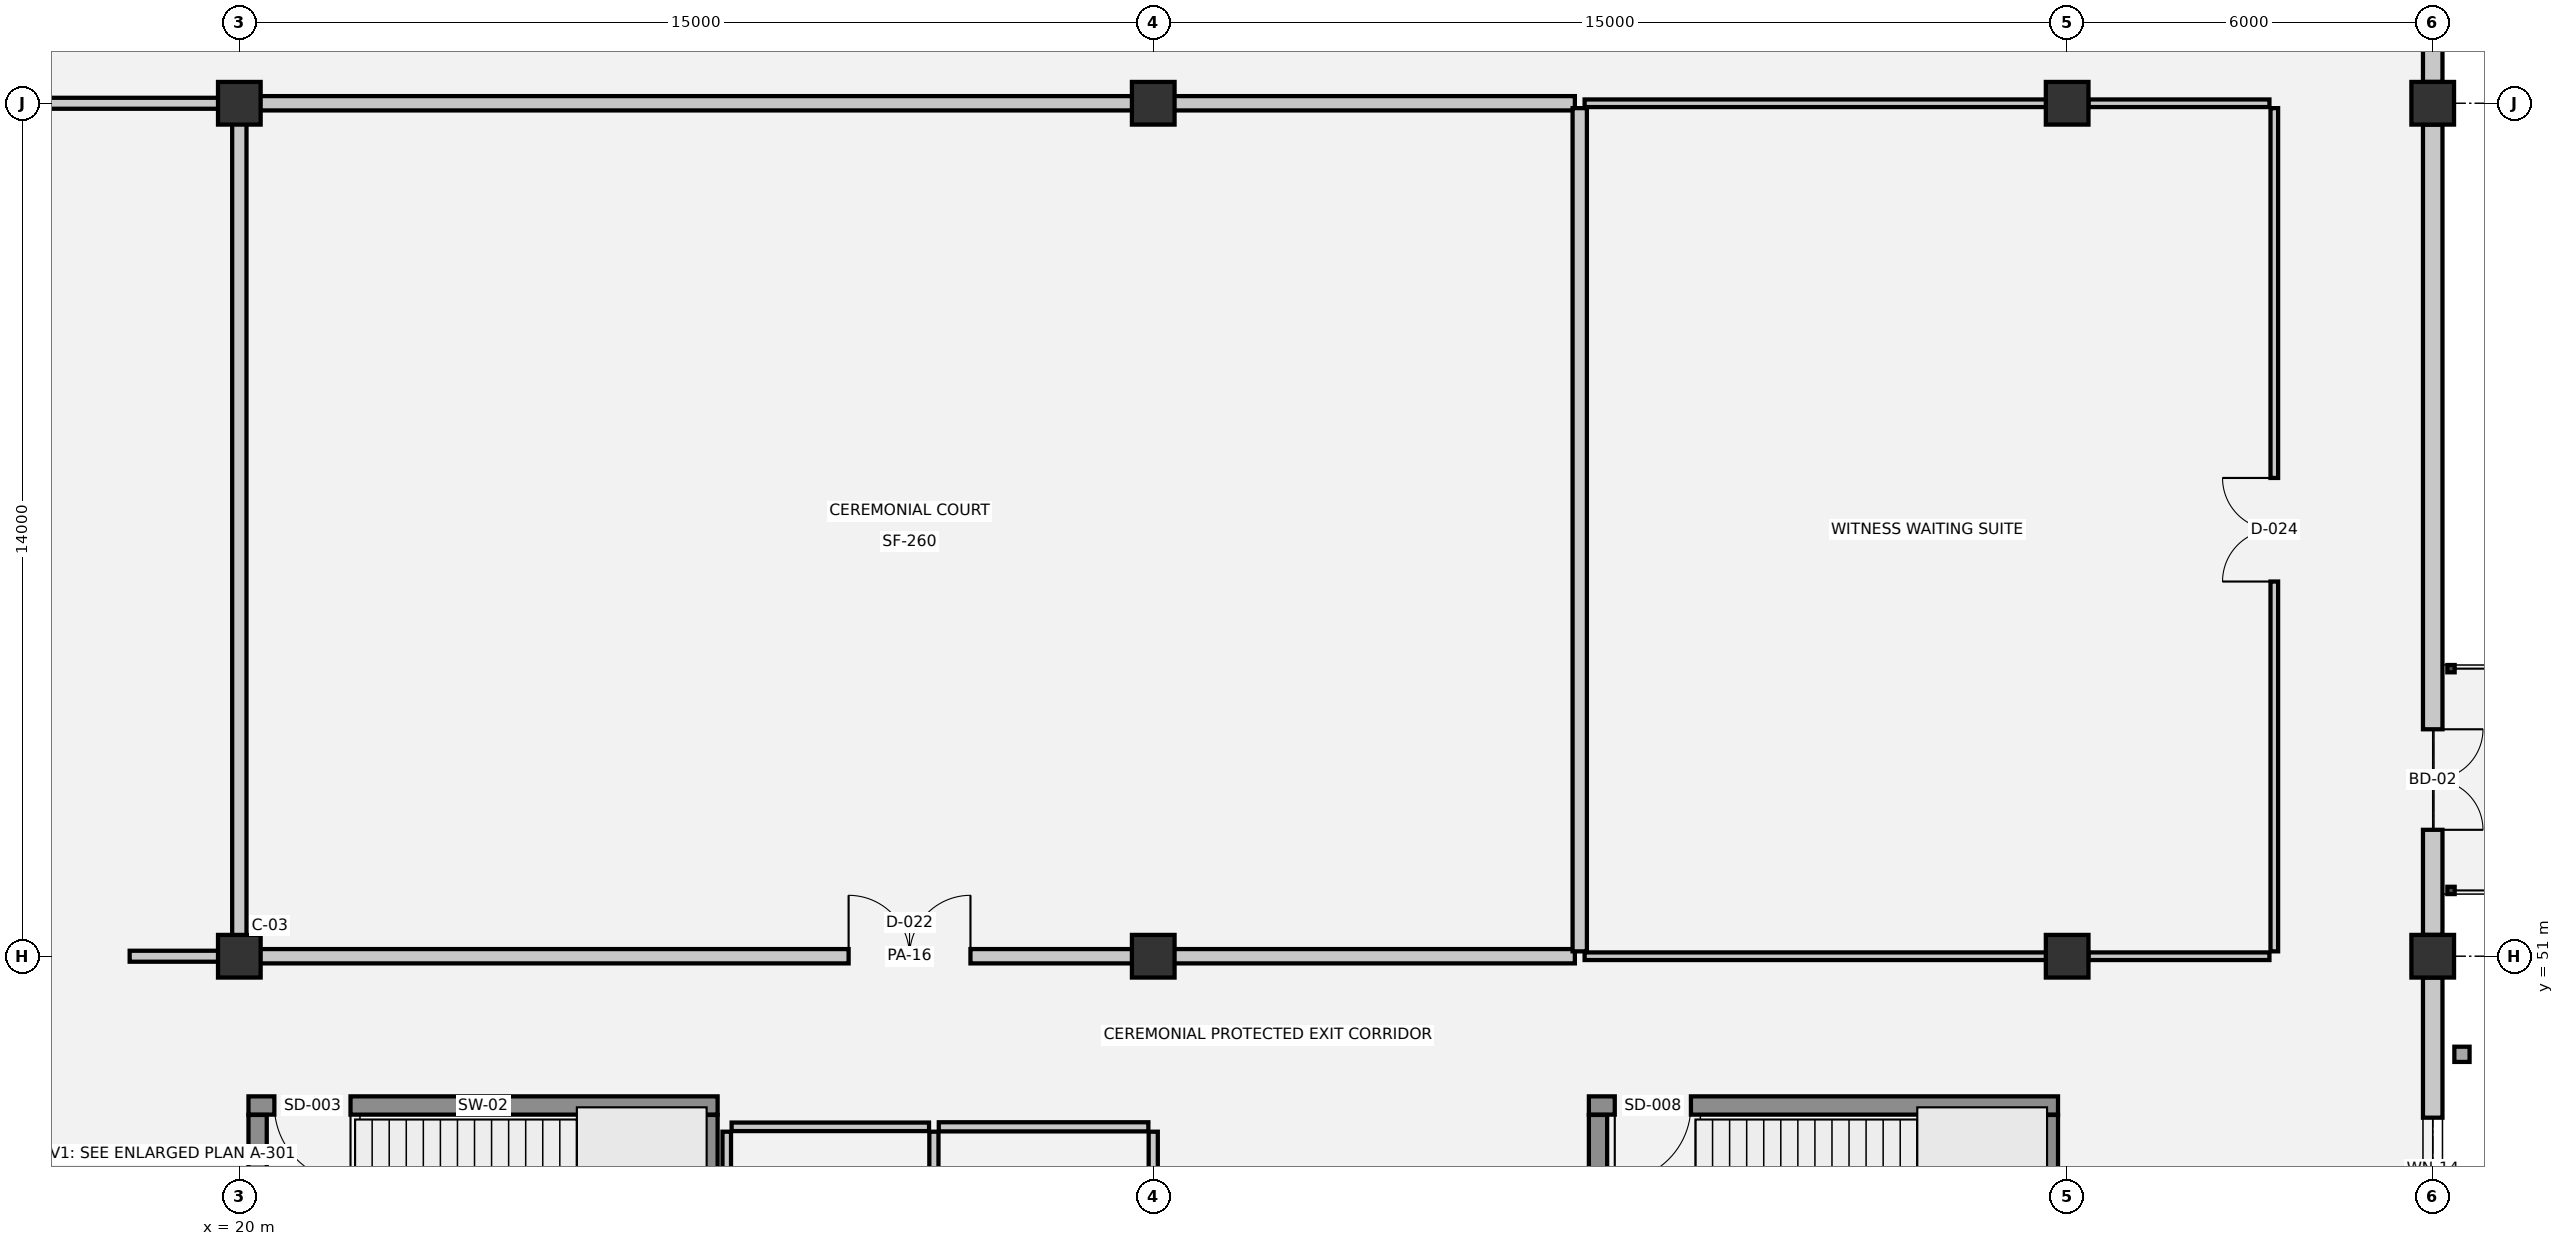
"""IFC4 building model, lengths in metres.
Left out: names, types, materials, properties, quantities, classifications, styles, units other than length and angle.
Written with IfcOpenShell. Run it as: python <this file> out.ifc"""

import sys

from ifc_helpers import new_model, si_unit, direction, frame, frame_2d, origin, origin_2d, place, context, subcontext, project, spatial, rectangle, extrude, element, fill, save


model = new_model("IFC4")
c1 = context("Model", 3, precision=1e-05, world=origin(), true_north=direction((0.0, 1.0)))
c2 = subcontext(c1, "Body", "Model", "MODEL_VIEW")
j1 = project(units=[si_unit("LENGTHUNIT", "METRE"), si_unit("PLANEANGLEUNIT", "RADIAN")], contexts=[c1])
p1 = place(None, origin())
s1 = spatial("IfcSite", under=j1, at=p1, CompositionType="ELEMENT")
p2 = place(p1, origin())
s2 = spatial("IfcBuilding", under=s1, at=p2, CompositionType="ELEMENT")
p3 = place(p2, frame((0.0, 0.0, 5.4)))
s3 = spatial("IfcBuildingStorey", under=s2, at=p3, CompositionType="ELEMENT", Elevation=5.4)
for number, where, z_axis, x_axis in (
    (1, (20.0, 51.0, 0.0), (0.0, 0.0, 1.0), (1.0, 0.0, 0.0)),
    (2, (20.0, 65.0, 0.0), (0.0, 0.0, 1.0), (1.0, 0.0, 0.0)),
    (3, (35.0, 51.0, 0.0), (0.0, 0.0, 1.0), (1.0, 0.0, 0.0)),
    (4, (35.0, 65.0, 0.0), (0.0, 0.0, 1.0), (1.0, 0.0, 0.0)),
    (5, (50.0, 51.0, 0.0), (0.0, 0.0, 1.0), (1.0, 0.0, 0.0)),
    (6, (50.0, 65.0, 0.0), (0.0, 0.0, 1.0), (1.0, 0.0, 0.0)),
    (7, (56.0, 51.0, 0.0), (0.0, 0.0, 1.0), (1.0, 0.0, 0.0)),
    (8, (56.0, 65.0, 0.0), (0.0, 0.0, 1.0), (1.0, 0.0, 0.0)),
):
    element("IfcColumn", number, at=place(p3, frame(where, z_axis=z_axis, x_axis=x_axis)), inside=s3, PredefinedType="COLUMN", context=c2, shape_type="SweptSolid", body=[
        extrude(rectangle(XDim=0.7, YDim=0.7, at=origin_2d()), origin(), (0.0, 0.0, 1.0), 4.5),
    ])
p4 = place(p3, frame((56.0, 71.65, 0.0), z_axis=(0.0, 0.0, 1.0), x_axis=(0.0, -1.0, 0.0)))
e9 = element("IfcWall", 9, at=p4, inside=s3, PredefinedType="SOLIDWALL", context=c2, shape_type="SweptSolid", body=[
    extrude(rectangle(XDim=6.3, YDim=0.32, at=frame_2d((3.15, 0.0))), origin(), (0.0, 0.0, 1.0), 3.11),
])
p5 = place(p4, frame((2.3, 0.0, 0.9)))
e10 = element("IfcOpeningElement", 10, at=p5, cuts=e9, PredefinedType="OPENING", context=c2, shape_type="SweptSolid", body=[
    extrude(rectangle(XDim=1.7, YDim=1.9, at=frame_2d((0.85, 0.95))), frame((0.0, 0.17, 0.0), z_axis=(0.0, -1.0, 0.0), x_axis=(1.0, 0.0, 0.0)), (0.0, 0.0, 1.0), 0.34),
])
p6 = place(p3, frame((56.0, 64.65, 0.0), z_axis=(0.0, 0.0, 1.0), x_axis=(0.0, -1.0, 0.0)))
e11 = element("IfcWall", 11, at=p6, inside=s3, PredefinedType="SOLIDWALL", context=c2, shape_type="SweptSolid", body=[
    extrude(rectangle(XDim=13.3, YDim=0.32, at=frame_2d((6.65, 0.0))), origin(), (0.0, 0.0, 1.0), 3.11),
])
p7 = place(p6, frame((9.925, 0.0, 0.0)))
e12 = element("IfcOpeningElement", 12, at=p7, cuts=e11, PredefinedType="OPENING", context=c2, shape_type="SweptSolid", body=[
    extrude(rectangle(XDim=1.65, YDim=2.2, at=frame_2d((0.825, 1.1))), frame((0.0, 0.17, 0.0), z_axis=(0.0, -1.0, 0.0), x_axis=(1.0, 0.0, 0.0)), (0.0, 0.0, 1.0), 0.34),
])
p8 = place(p3, frame((56.0, 50.65, 0.0), z_axis=(0.0, 0.0, 1.0), x_axis=(0.0, -1.0, 0.0)))
e13 = element("IfcWall", 13, at=p8, inside=s3, PredefinedType="SOLIDWALL", context=c2, shape_type="SweptSolid", body=[
    extrude(rectangle(XDim=6.3, YDim=0.32, at=frame_2d((3.15, 0.0))), origin(), (0.0, 0.0, 1.0), 3.11),
])
p9 = place(p8, frame((2.3, 0.0, 0.9)))
e14 = element("IfcOpeningElement", 14, at=p9, cuts=e13, PredefinedType="OPENING", context=c2, shape_type="SweptSolid", body=[
    extrude(rectangle(XDim=1.7, YDim=1.9, at=frame_2d((0.85, 0.95))), frame((0.0, 0.17, 0.0), z_axis=(0.0, -1.0, 0.0), x_axis=(1.0, 0.0, 0.0)), (0.0, 0.0, 1.0), 0.34),
])
p10 = place(p3, frame((27.85, 48.55, 0.0), z_axis=(0.0, 0.0, 1.0), x_axis=(-1.0, 0.0, 0.0)))
e15 = element("IfcWall", 15, at=p10, inside=s3, PredefinedType="SHEAR", context=c2, shape_type="SweptSolid", body=[
    extrude(rectangle(XDim=7.7, YDim=0.3, at=frame_2d((3.85, 0.0))), origin(), (0.0, 0.0, 1.0), 4.24),
])
p11 = place(p10, frame((6.025, 0.0, 0.0)))
e16 = element("IfcOpeningElement", 16, at=p11, cuts=e15, PredefinedType="OPENING", context=c2, shape_type="SweptSolid", body=[
    extrude(rectangle(XDim=1.25, YDim=2.15, at=frame_2d((0.625, 1.075))), frame((0.0, 0.16, 0.0), z_axis=(0.0, -1.0, 0.0), x_axis=(1.0, 0.0, 0.0)), (0.0, 0.0, 1.0), 0.32),
])
for number, where, z_axis, x_axis in (
    (17, (20.3, 48.395, 0.0), (0.0, 0.0, 1.0), (0.0, -1.0, 0.0)),
    (18, (27.7, 44.195, 0.0), (0.0, 0.0, 1.0), (0.0, 1.0, 0.0)),
):
    element("IfcWall", number, at=place(p3, frame(where, z_axis=z_axis, x_axis=x_axis)), inside=s3, PredefinedType="SHEAR", context=c2, shape_type="SweptSolid", body=[
        extrude(rectangle(XDim=4.2, YDim=0.3, at=frame_2d((2.1, 0.0))), origin(), (0.0, 0.0, 1.0), 4.24),
    ])
p12 = place(p3, frame((49.85, 48.55, 0.0), z_axis=(0.0, 0.0, 1.0), x_axis=(-1.0, 0.0, 0.0)))
e19 = element("IfcWall", 19, at=p12, inside=s3, PredefinedType="SHEAR", context=c2, shape_type="SweptSolid", body=[
    extrude(rectangle(XDim=7.7, YDim=0.3, at=frame_2d((3.85, 0.0))), origin(), (0.0, 0.0, 1.0), 4.24),
])
p13 = place(p12, frame((6.025, 0.0, 0.0)))
e20 = element("IfcOpeningElement", 20, at=p13, cuts=e19, PredefinedType="OPENING", context=c2, shape_type="SweptSolid", body=[
    extrude(rectangle(XDim=1.25, YDim=2.15, at=frame_2d((0.625, 1.075))), frame((0.0, 0.16, 0.0), z_axis=(0.0, -1.0, 0.0), x_axis=(1.0, 0.0, 0.0)), (0.0, 0.0, 1.0), 0.32),
])
for number, where, z_axis, x_axis in (
    (21, (42.3, 48.395, 0.0), (0.0, 0.0, 1.0), (0.0, -1.0, 0.0)),
    (22, (49.7, 44.195, 0.0), (0.0, 0.0, 1.0), (0.0, 1.0, 0.0)),
):
    element("IfcWall", number, at=place(p3, frame(where, z_axis=z_axis, x_axis=x_axis)), inside=s3, PredefinedType="SHEAR", context=c2, shape_type="SweptSolid", body=[
        extrude(rectangle(XDim=4.2, YDim=0.3, at=frame_2d((2.1, 0.0))), origin(), (0.0, 0.0, 1.0), 4.24),
    ])
p14 = place(p3, frame((28.08, 48.2, 0.0), z_axis=(0.0, 0.0, 1.0), x_axis=(1.0, 0.0, 0.0)))
e23 = element("IfcWall", 23, at=p14, inside=s3, PredefinedType="PLUMBINGWALL", context=c2, shape_type="SweptSolid", body=[
    extrude(rectangle(XDim=3.24, YDim=0.14, at=frame_2d((1.62, 0.0))), origin(), (0.0, 0.0, 1.0), 4.14),
])
p15 = place(p3, frame((31.48, 48.2, 0.0), z_axis=(0.0, 0.0, 1.0), x_axis=(1.0, 0.0, 0.0)))
e24 = element("IfcWall", 24, at=p15, inside=s3, PredefinedType="PARTITIONING", context=c2, shape_type="SweptSolid", body=[
    extrude(rectangle(XDim=3.44, YDim=0.15, at=frame_2d((1.72, 0.0))), origin(), (0.0, 0.0, 1.0), 4.14),
])
p16 = place(p3, frame((18.2, 51.0, 0.0), z_axis=(0.0, 0.0, 1.0), x_axis=(1.0, 0.0, 0.0)))
e25 = element("IfcWall", 25, at=p16, inside=s3, PredefinedType="PARTITIONING", context=c2, shape_type="SweptSolid", body=[
    extrude(rectangle(XDim=1.72, YDim=0.18, at=frame_2d((0.86, 0.0))), origin(), (0.0, 0.0, 1.0), 3.53),
])
p17 = place(p3, frame((20.08, 51.0, 0.0), z_axis=(0.0, 0.0, 1.0), x_axis=(1.0, 0.0, 0.0)))
e26 = element("IfcWall", 26, at=p17, inside=s3, PredefinedType="PARTITIONING", context=c2, shape_type="SweptSolid", body=[
    extrude(rectangle(XDim=21.84, YDim=0.235, at=frame_2d((10.92, 0.0))), origin(), (0.0, 0.0, 1.0), 3.28),
])
p18 = place(p17, frame((9.92, 0.0, 0.0)))
e27 = element("IfcOpeningElement", 27, at=p18, cuts=e26, PredefinedType="OPENING", context=c2, shape_type="SweptSolid", body=[
    extrude(rectangle(XDim=2.0, YDim=2.35, at=frame_2d((1.0, 1.175))), frame((0.0, 0.127, 0.0), z_axis=(0.0, -1.0, 0.0), x_axis=(1.0, 0.0, 0.0)), (0.0, 0.0, 1.0), 0.255),
])
p19 = place(p3, frame((42.08, 51.0, 0.0), z_axis=(0.0, 0.0, 1.0), x_axis=(1.0, 0.0, 0.0)))
e28 = element("IfcWall", 28, at=p19, inside=s3, PredefinedType="PARTITIONING", context=c2, shape_type="SweptSolid", body=[
    extrude(rectangle(XDim=8.27, YDim=0.125, at=frame_2d((4.135, 0.0))), origin(), (0.0, 0.0, 1.0), 3.28),
])
p20 = place(p3, frame((50.35, 51.0, 0.0), z_axis=(0.0, 0.0, 1.0), x_axis=(1.0, 0.0, 0.0)))
e29 = element("IfcWall", 29, at=p20, inside=s3, PredefinedType="PARTITIONING", context=c2, shape_type="SweptSolid", body=[
    extrude(rectangle(XDim=2.97, YDim=0.125, at=frame_2d((1.485, 0.0))), origin(), (0.0, 0.0, 1.0), 3.53),
])
p21 = place(p3, frame((6.08, 65.0, 0.0), z_axis=(0.0, 0.0, 1.0), x_axis=(1.0, 0.0, 0.0)))
e30 = element("IfcWall", 30, at=p21, inside=s3, PredefinedType="PARTITIONING", context=c2, shape_type="SweptSolid", body=[
    extrude(rectangle(XDim=13.84, YDim=0.18, at=frame_2d((6.92, 0.0))), origin(), (0.0, 0.0, 1.0), 3.53),
])
p22 = place(p21, frame((6.345, 0.0, 0.0)))
e31 = element("IfcOpeningElement", 31, at=p22, cuts=e30, PredefinedType="OPENING", context=c2, shape_type="SweptSolid", body=[
    extrude(rectangle(XDim=1.15, YDim=2.2, at=frame_2d((0.575, 1.1))), frame((0.0, 0.1, 0.0), z_axis=(0.0, -1.0, 0.0), x_axis=(1.0, 0.0, 0.0)), (0.0, 0.0, 1.0), 0.2),
])
p23 = place(p3, frame((20.08, 65.0, 0.0), z_axis=(0.0, 0.0, 1.0), x_axis=(1.0, 0.0, 0.0)))
e32 = element("IfcWall", 32, at=p23, inside=s3, PredefinedType="PARTITIONING", context=c2, shape_type="SweptSolid", body=[
    extrude(rectangle(XDim=21.84, YDim=0.235, at=frame_2d((10.92, 0.0))), origin(), (0.0, 0.0, 1.0), 3.28),
])
p24 = place(p3, frame((42.08, 65.0, 0.0), z_axis=(0.0, 0.0, 1.0), x_axis=(1.0, 0.0, 0.0)))
e33 = element("IfcWall", 33, at=p24, inside=s3, PredefinedType="PARTITIONING", context=c2, shape_type="SweptSolid", body=[
    extrude(rectangle(XDim=8.27, YDim=0.125, at=frame_2d((4.135, 0.0))), origin(), (0.0, 0.0, 1.0), 3.28),
])
p25 = place(p3, frame((50.35, 65.0, 0.0), z_axis=(0.0, 0.0, 1.0), x_axis=(1.0, 0.0, 0.0)))
e34 = element("IfcWall", 34, at=p25, inside=s3, PredefinedType="PARTITIONING", context=c2, shape_type="SweptSolid", body=[
    extrude(rectangle(XDim=2.97, YDim=0.125, at=frame_2d((1.485, 0.0))), origin(), (0.0, 0.0, 1.0), 3.53),
])
p26 = place(p3, frame((20.0, 51.08, 0.0), z_axis=(0.0, 0.0, 1.0), x_axis=(0.0, 1.0, 0.0)))
e35 = element("IfcWall", 35, at=p26, inside=s3, PredefinedType="PARTITIONING", context=c2, shape_type="SweptSolid", body=[
    extrude(rectangle(XDim=13.84, YDim=0.235, at=frame_2d((6.92, 0.0))), origin(), (0.0, 0.0, 1.0), 3.13),
])
p27 = place(p3, frame((28.0, 44.08, 0.0), z_axis=(0.0, 0.0, 1.0), x_axis=(0.0, 1.0, 0.0)))
e36 = element("IfcWall", 36, at=p27, inside=s3, PredefinedType="PLUMBINGWALL", context=c2, shape_type="SweptSolid", body=[
    extrude(rectangle(XDim=4.04, YDim=0.14, at=frame_2d((2.02, 0.0))), origin(), (0.0, 0.0, 1.0), 4.14),
])
p28 = place(p3, frame((31.4, 44.08, 0.0), z_axis=(0.0, 0.0, 1.0), x_axis=(0.0, 1.0, 0.0)))
e37 = element("IfcWall", 37, at=p28, inside=s3, PredefinedType="PARTITIONING", context=c2, shape_type="SweptSolid", body=[
    extrude(rectangle(XDim=4.04, YDim=0.15, at=frame_2d((2.02, 0.0))), origin(), (0.0, 0.0, 1.0), 4.14),
])
p29 = place(p28, frame((1.56, 0.0, 0.0)))
e38 = element("IfcOpeningElement", 38, at=p29, cuts=e37, PredefinedType="OPENING", context=c2, shape_type="SweptSolid", body=[
    extrude(rectangle(XDim=0.92, YDim=2.1, at=frame_2d((0.46, 1.05))), frame((0.0, 0.085, 0.0), z_axis=(0.0, -1.0, 0.0), x_axis=(1.0, 0.0, 0.0)), (0.0, 0.0, 1.0), 0.17),
])
p30 = place(p3, frame((35.0, 44.08, 0.0), z_axis=(0.0, 0.0, 1.0), x_axis=(0.0, 1.0, 0.0)))
e39 = element("IfcWall", 39, at=p30, inside=s3, PredefinedType="PARTITIONING", context=c2, shape_type="SweptSolid", body=[
    extrude(rectangle(XDim=4.04, YDim=0.15, at=frame_2d((2.02, 0.0))), origin(), (0.0, 0.0, 1.0), 3.58),
])
p31 = place(p30, frame((1.34, 0.0, 0.0)))
e40 = element("IfcOpeningElement", 40, at=p31, cuts=e39, PredefinedType="OPENING", context=c2, shape_type="SweptSolid", body=[
    extrude(rectangle(XDim=1.36, YDim=2.2, at=frame_2d((0.68, 1.1))), frame((0.0, 0.085, 0.0), z_axis=(0.0, -1.0, 0.0), x_axis=(1.0, 0.0, 0.0)), (0.0, 0.0, 1.0), 0.17),
])
p32 = place(p3, frame((42.0, 51.08, 0.0), z_axis=(0.0, 0.0, 1.0), x_axis=(0.0, 1.0, 0.0)))
e41 = element("IfcWall", 41, at=p32, inside=s3, PredefinedType="PARTITIONING", context=c2, shape_type="SweptSolid", body=[
    extrude(rectangle(XDim=13.84, YDim=0.235, at=frame_2d((6.92, 0.0))), origin(), (0.0, 0.0, 1.0), 4.14),
])
p33 = place(p3, frame((53.4, 51.08, 0.0), z_axis=(0.0, 0.0, 1.0), x_axis=(0.0, 1.0, 0.0)))
e42 = element("IfcWall", 42, at=p33, inside=s3, PredefinedType="PARTITIONING", context=c2, shape_type="SweptSolid", body=[
    extrude(rectangle(XDim=13.84, YDim=0.125, at=frame_2d((6.92, 0.0))), origin(), (0.0, 0.0, 1.0), 4.14),
])
p34 = place(p33, frame((6.07, 0.0, 0.0)))
e43 = element("IfcOpeningElement", 43, at=p34, cuts=e42, PredefinedType="OPENING", context=c2, shape_type="SweptSolid", body=[
    extrude(rectangle(XDim=1.7, YDim=2.3, at=frame_2d((0.85, 1.15))), frame((0.0, 0.073, 0.0), z_axis=(0.0, -1.0, 0.0), x_axis=(1.0, 0.0, 0.0)), (0.0, 0.0, 1.0), 0.145),
])
p35 = place(p7, origin())
e44 = element("IfcDoor", 44, at=p35, inside=s3, OperationType="DOUBLE_DOOR_SINGLE_SWING", PredefinedType="DOOR", context=c2, shape_type="SweptSolid", body=[
    extrude(rectangle(XDim=1.65, YDim=2.2, at=frame_2d((0.825, 1.1))), frame((0.0, 0.025, 0.0), z_axis=(0.0, -1.0, 0.0), x_axis=(1.0, 0.0, 0.0)), (0.0, 0.0, 1.0), 0.05),
])
fill(e12, e44)
p36 = place(p9, origin())
e45 = element("IfcWindow", 45, at=p36, inside=s3, PartitioningType="SINGLE_PANEL", PredefinedType="WINDOW", context=c2, shape_type="SweptSolid", body=[
    extrude(rectangle(XDim=1.7, YDim=1.9, at=frame_2d((0.85, 0.95))), frame((0.0, 0.03, 0.0), z_axis=(0.0, -1.0, 0.0), x_axis=(1.0, 0.0, 0.0)), (0.0, 0.0, 1.0), 0.06),
])
fill(e14, e45)
p37 = place(p11, origin())
e46 = element("IfcDoor", 46, at=p37, inside=s3, OperationType="SINGLE_SWING_LEFT", PredefinedType="DOOR", context=c2, shape_type="SweptSolid", body=[
    extrude(rectangle(XDim=1.25, YDim=2.15, at=frame_2d((0.625, 1.075))), frame((0.0, 0.025, 0.0), z_axis=(0.0, -1.0, 0.0), x_axis=(1.0, 0.0, 0.0)), (0.0, 0.0, 1.0), 0.05),
])
fill(e16, e46)
p38 = place(p13, origin())
e47 = element("IfcDoor", 47, at=p38, inside=s3, OperationType="SINGLE_SWING_RIGHT", PredefinedType="DOOR", context=c2, shape_type="SweptSolid", body=[
    extrude(rectangle(XDim=1.25, YDim=2.15, at=frame_2d((0.625, 1.075))), frame((0.0, 0.025, 0.0), z_axis=(0.0, -1.0, 0.0), x_axis=(1.0, 0.0, 0.0)), (0.0, 0.0, 1.0), 0.05),
])
fill(e20, e47)
p39 = place(p18, origin())
e48 = element("IfcDoor", 48, at=p39, inside=s3, OperationType="DOUBLE_DOOR_SINGLE_SWING", PredefinedType="DOOR", context=c2, shape_type="SweptSolid", body=[
    extrude(rectangle(XDim=2.0, YDim=2.35, at=frame_2d((1.0, 1.175))), frame((0.0, 0.025, 0.0), z_axis=(0.0, -1.0, 0.0), x_axis=(1.0, 0.0, 0.0)), (0.0, 0.0, 1.0), 0.05),
])
fill(e27, e48)
p40 = place(p34, origin())
e49 = element("IfcDoor", 49, at=p40, inside=s3, OperationType="DOUBLE_DOOR_SINGLE_SWING", PredefinedType="DOOR", context=c2, shape_type="SweptSolid", body=[
    extrude(rectangle(XDim=1.7, YDim=2.3, at=frame_2d((0.85, 1.15))), frame((0.0, 0.025, 0.0), z_axis=(0.0, -1.0, 0.0), x_axis=(1.0, 0.0, 0.0)), (0.0, 0.0, 1.0), 0.05),
])
fill(e43, e49)
save(model, sys.argv[1])
